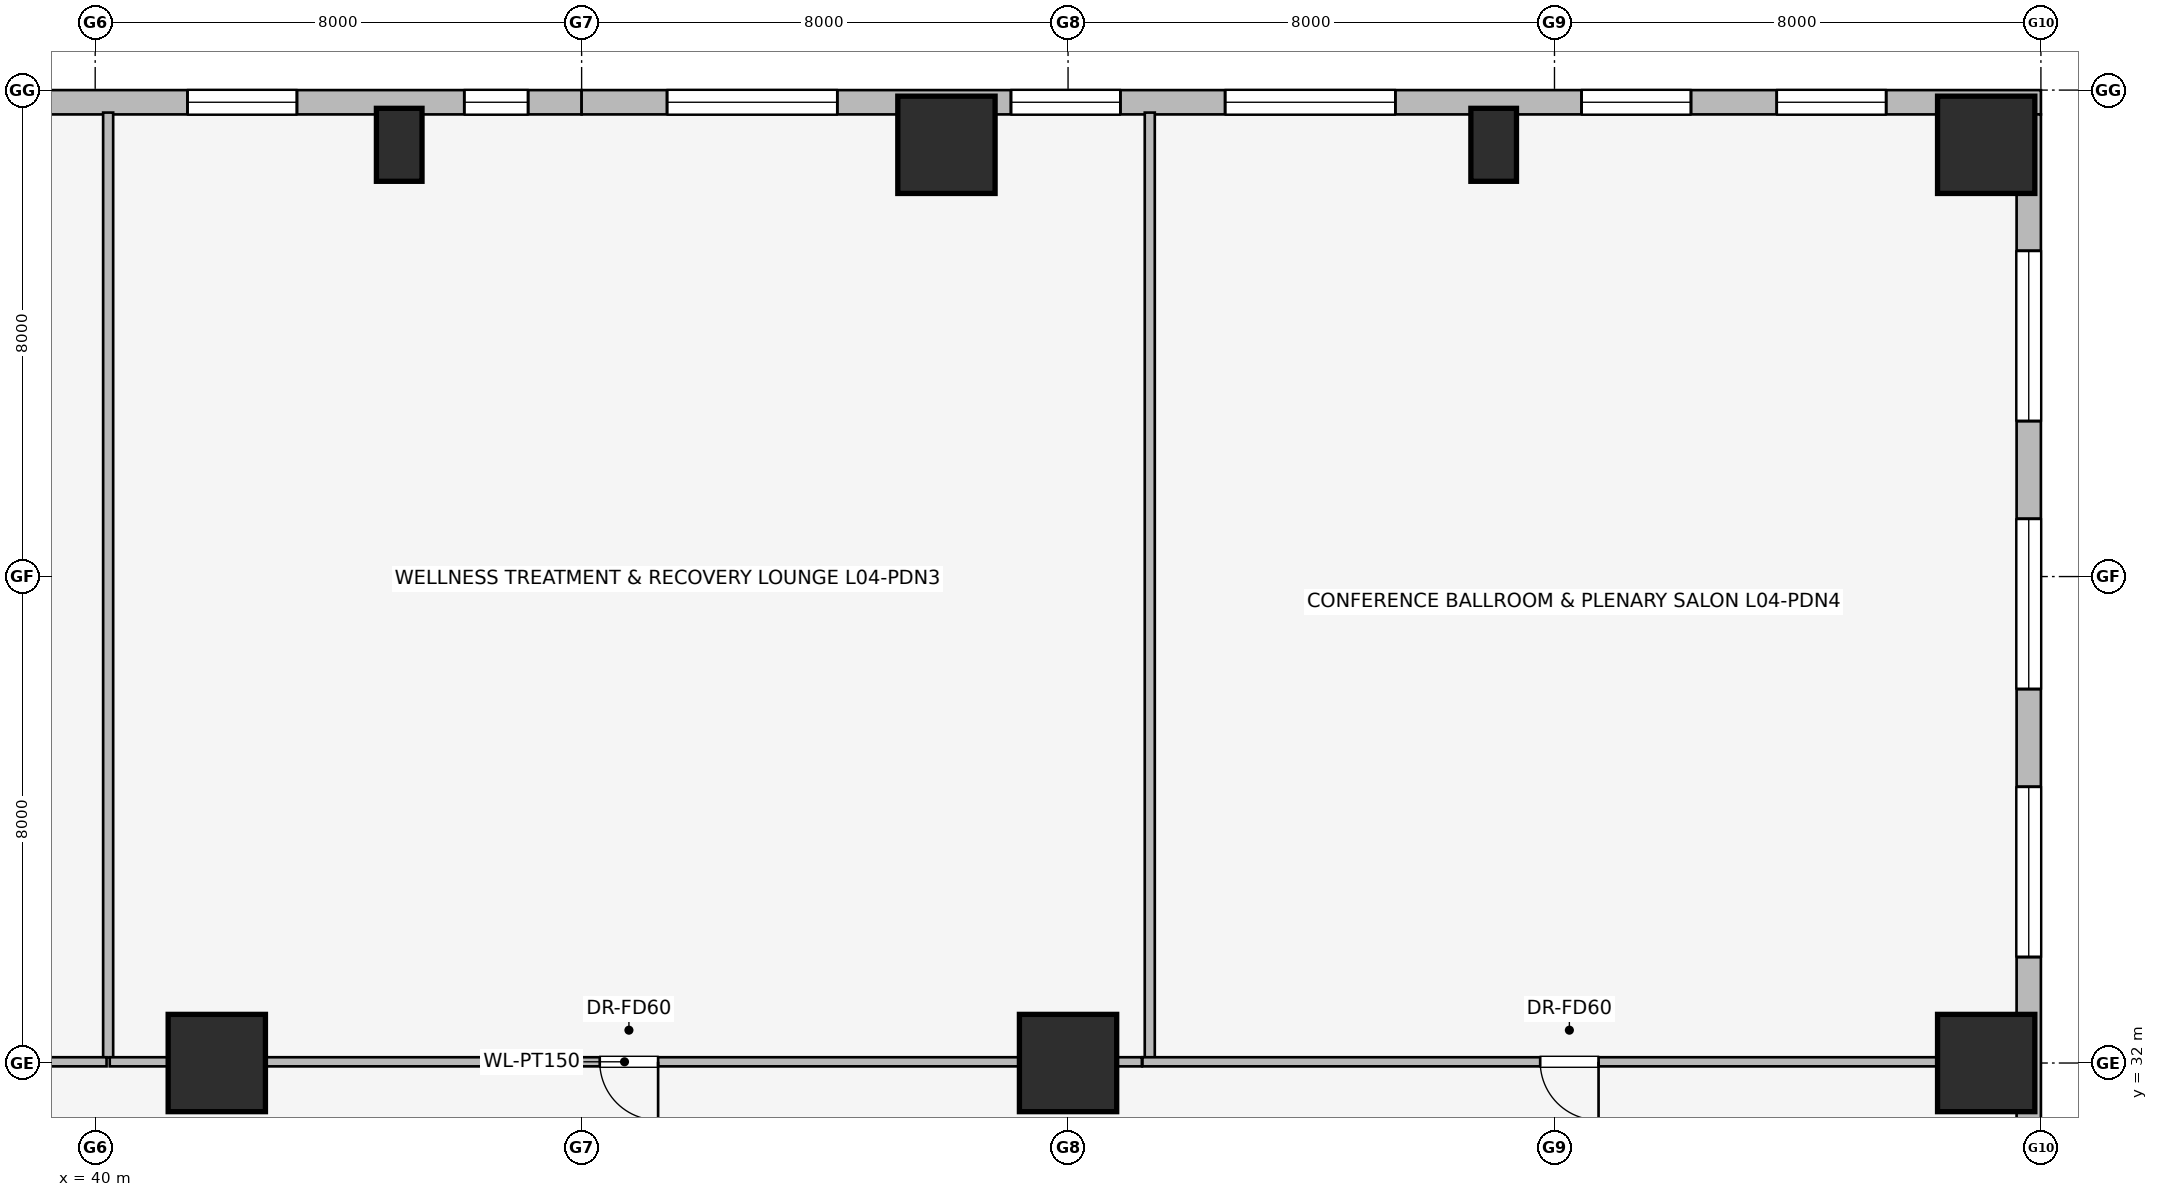
"""IFC4 building model, lengths in metres.
Left out: names, types, materials, properties, quantities, classifications, styles, units other than length and angle.
Written with IfcOpenShell. Run it as: python <this file> out.ifc"""

import sys

from ifc_helpers import new_model, si_unit, direction, frame, frame_2d, origin, origin_2d, place, context, subcontext, project, spatial, rectangle, extrude, element, fill, save


model = new_model("IFC4")
c1 = context("Model", 3, precision=1e-05, world=origin(), true_north=direction((0.0, 1.0)))
c2 = subcontext(c1, "Body", "Model", "MODEL_VIEW")
j1 = project(units=[si_unit("LENGTHUNIT", "METRE"), si_unit("PLANEANGLEUNIT", "RADIAN")], contexts=[c1])
p1 = place(None, origin())
s1 = spatial("IfcSite", under=j1, at=p1, CompositionType="ELEMENT")
p2 = place(p1, origin())
s2 = spatial("IfcBuilding", under=s1, at=p2, CompositionType="ELEMENT")
p3 = place(p2, frame((0.0, 0.0, 16.0)))
s3 = spatial("IfcBuildingStorey", under=s2, at=p3, CompositionType="ELEMENT", Elevation=16.0)
for number, where, z_axis, x_axis in (
    (1, (71.1, 47.1, 0.0), (0.0, 0.0, 1.0), (1.0, 0.0, 0.0)),
    (2, (54.0, 47.1, 0.0), (0.0, 0.0, 1.0), (1.0, 0.0, 0.0)),
    (3, (71.1, 32.0, 0.0), (0.0, 0.0, 1.0), (1.0, 0.0, 0.0)),
    (4, (42.0, 32.0, 0.0), (0.0, 0.0, 1.0), (1.0, 0.0, 0.0)),
    (5, (56.0, 32.0, 0.0), (0.0, 0.0, 1.0), (1.0, 0.0, 0.0)),
):
    element("IfcColumn", number, at=place(p3, frame(where, z_axis=z_axis, x_axis=x_axis)), inside=s3, PredefinedType="COLUMN", context=c2, shape_type="SweptSolid", body=[
        extrude(rectangle(XDim=1.6, YDim=1.6, at=origin_2d()), origin(), (0.0, 0.0, 1.0), 5.0),
    ])
for number, where, z_axis, x_axis in (
    (6, (45.0, 47.1, 0.0), (0.0, 0.0, 1.0), (1.0, 0.0, 0.0)),
    (7, (63.0, 47.1, 0.0), (0.0, 0.0, 1.0), (1.0, 0.0, 0.0)),
):
    element("IfcColumn", number, at=place(p3, frame(where, z_axis=z_axis, x_axis=x_axis)), inside=s3, PredefinedType="PILASTER", context=c2, shape_type="SweptSolid", body=[
        extrude(rectangle(XDim=0.75, YDim=1.2, at=origin_2d()), origin(), (0.0, 0.0, 1.0), 5.0),
    ])
p4 = place(p3, frame((24.0, 47.8, 0.0), z_axis=(0.0, 0.0, 1.0), x_axis=(1.0, 0.0, 0.0)))
e8 = element("IfcWall", 8, at=p4, inside=s3, PredefinedType="STANDARD", context=c2, shape_type="SweptSolid", body=[
    extrude(rectangle(XDim=24.0, YDim=0.4, at=frame_2d((12.0, 0.0))), origin(), (0.0, 0.0, 1.0), 4.58),
])
p5 = place(p4, frame((0.88, 0.0, 0.75)))
e9 = element("IfcOpeningElement", 9, at=p5, cuts=e8, PredefinedType="OPENING", context=c2, shape_type="SweptSolid", body=[
    extrude(rectangle(XDim=1.05, YDim=1.4, at=frame_2d((0.525, 0.7))), frame((0.0, 0.21, 0.0), z_axis=(0.0, -1.0, 0.0), x_axis=(1.0, 0.0, 0.0)), (0.0, 0.0, 1.0), 0.42),
])
p6 = place(p4, frame((4.06, 0.0, 0.75)))
e10 = element("IfcOpeningElement", 10, at=p6, cuts=e8, PredefinedType="OPENING", context=c2, shape_type="SweptSolid", body=[
    extrude(rectangle(XDim=1.8, YDim=1.5, at=frame_2d((0.9, 0.75))), frame((0.0, 0.21, 0.0), z_axis=(0.0, -1.0, 0.0), x_axis=(1.0, 0.0, 0.0)), (0.0, 0.0, 1.0), 0.42),
])
p7 = place(p4, frame((6.5, 0.0, 0.75)))
e11 = element("IfcOpeningElement", 11, at=p7, cuts=e8, PredefinedType="OPENING", context=c2, shape_type="SweptSolid", body=[
    extrude(rectangle(XDim=1.8, YDim=1.5, at=frame_2d((0.9, 0.75))), frame((0.0, 0.21, 0.0), z_axis=(0.0, -1.0, 0.0), x_axis=(1.0, 0.0, 0.0)), (0.0, 0.0, 1.0), 0.42),
])
p8 = place(p4, frame((8.94, 0.0, 0.75)))
e12 = element("IfcOpeningElement", 12, at=p8, cuts=e8, PredefinedType="OPENING", context=c2, shape_type="SweptSolid", body=[
    extrude(rectangle(XDim=1.8, YDim=1.5, at=frame_2d((0.9, 0.75))), frame((0.0, 0.21, 0.0), z_axis=(0.0, -1.0, 0.0), x_axis=(1.0, 0.0, 0.0)), (0.0, 0.0, 1.0), 0.42),
])
p9 = place(p4, frame((13.87, 0.0, 0.75)))
e13 = element("IfcOpeningElement", 13, at=p9, cuts=e8, PredefinedType="OPENING", context=c2, shape_type="SweptSolid", body=[
    extrude(rectangle(XDim=1.05, YDim=1.4, at=frame_2d((0.525, 0.7))), frame((0.0, 0.21, 0.0), z_axis=(0.0, -1.0, 0.0), x_axis=(1.0, 0.0, 0.0)), (0.0, 0.0, 1.0), 0.42),
])
p10 = place(p4, frame((17.518, 0.0, 0.75)))
e14 = element("IfcOpeningElement", 14, at=p10, cuts=e8, PredefinedType="OPENING", context=c2, shape_type="SweptSolid", body=[
    extrude(rectangle(XDim=1.8, YDim=1.5, at=frame_2d((0.9, 0.75))), frame((0.0, 0.21, 0.0), z_axis=(0.0, -1.0, 0.0), x_axis=(1.0, 0.0, 0.0)), (0.0, 0.0, 1.0), 0.42),
])
p11 = place(p4, frame((22.07, 0.0, 0.75)))
e15 = element("IfcOpeningElement", 15, at=p11, cuts=e8, PredefinedType="OPENING", context=c2, shape_type="SweptSolid", body=[
    extrude(rectangle(XDim=1.05, YDim=1.4, at=frame_2d((0.525, 0.7))), frame((0.0, 0.21, 0.0), z_axis=(0.0, -1.0, 0.0), x_axis=(1.0, 0.0, 0.0)), (0.0, 0.0, 1.0), 0.42),
])
p12 = place(p3, frame((48.0, 47.8, 0.0), z_axis=(0.0, 0.0, 1.0), x_axis=(1.0, 0.0, 0.0)))
e16 = element("IfcWall", 16, at=p12, inside=s3, PredefinedType="STANDARD", context=c2, shape_type="SweptSolid", body=[
    extrude(rectangle(XDim=24.0, YDim=0.4, at=frame_2d((12.0, 0.0))), origin(), (0.0, 0.0, 1.0), 4.58),
])
p13 = place(p12, frame((1.405, 0.0, 0.75)))
e17 = element("IfcOpeningElement", 17, at=p13, cuts=e16, PredefinedType="OPENING", context=c2, shape_type="SweptSolid", body=[
    extrude(rectangle(XDim=2.8, YDim=1.8, at=frame_2d((1.4, 0.9))), frame((0.0, 0.21, 0.0), z_axis=(0.0, -1.0, 0.0), x_axis=(1.0, 0.0, 0.0)), (0.0, 0.0, 1.0), 0.42),
])
p14 = place(p12, frame((7.061, 0.0, 0.75)))
e18 = element("IfcOpeningElement", 18, at=p14, cuts=e16, PredefinedType="OPENING", context=c2, shape_type="SweptSolid", body=[
    extrude(rectangle(XDim=1.8, YDim=1.5, at=frame_2d((0.9, 0.75))), frame((0.0, 0.21, 0.0), z_axis=(0.0, -1.0, 0.0), x_axis=(1.0, 0.0, 0.0)), (0.0, 0.0, 1.0), 0.42),
])
p15 = place(p12, frame((10.583, 0.0, 0.75)))
e19 = element("IfcOpeningElement", 19, at=p15, cuts=e16, PredefinedType="OPENING", context=c2, shape_type="SweptSolid", body=[
    extrude(rectangle(XDim=2.8, YDim=1.8, at=frame_2d((1.4, 0.9))), frame((0.0, 0.21, 0.0), z_axis=(0.0, -1.0, 0.0), x_axis=(1.0, 0.0, 0.0)), (0.0, 0.0, 1.0), 0.42),
])
p16 = place(p12, frame((16.445, 0.0, 0.75)))
e20 = element("IfcOpeningElement", 20, at=p16, cuts=e16, PredefinedType="OPENING", context=c2, shape_type="SweptSolid", body=[
    extrude(rectangle(XDim=1.8, YDim=1.5, at=frame_2d((0.9, 0.75))), frame((0.0, 0.21, 0.0), z_axis=(0.0, -1.0, 0.0), x_axis=(1.0, 0.0, 0.0)), (0.0, 0.0, 1.0), 0.42),
])
p17 = place(p12, frame((19.655, 0.0, 0.75)))
e21 = element("IfcOpeningElement", 21, at=p17, cuts=e16, PredefinedType="OPENING", context=c2, shape_type="SweptSolid", body=[
    extrude(rectangle(XDim=1.8, YDim=1.5, at=frame_2d((0.9, 0.75))), frame((0.0, 0.21, 0.0), z_axis=(0.0, -1.0, 0.0), x_axis=(1.0, 0.0, 0.0)), (0.0, 0.0, 1.0), 0.42),
])
p18 = place(p3, frame((71.8, 47.6, 0.0), z_axis=(0.0, 0.0, 1.0), x_axis=(0.0, -1.0, 0.0)))
e22 = element("IfcWall", 22, at=p18, inside=s3, PredefinedType="STANDARD", context=c2, shape_type="SweptSolid", body=[
    extrude(rectangle(XDim=16.6, YDim=0.4, at=frame_2d((8.3, 0.0))), origin(), (0.0, 0.0, 1.0), 4.58),
])
p19 = place(p18, frame((2.243, 0.0, 0.75)))
e23 = element("IfcOpeningElement", 23, at=p19, cuts=e22, PredefinedType="OPENING", context=c2, shape_type="SweptSolid", body=[
    extrude(rectangle(XDim=2.8, YDim=1.8, at=frame_2d((1.4, 0.9))), frame((0.0, 0.21, 0.0), z_axis=(0.0, -1.0, 0.0), x_axis=(1.0, 0.0, 0.0)), (0.0, 0.0, 1.0), 0.42),
])
p20 = place(p18, frame((6.65, 0.0, 0.75)))
e24 = element("IfcOpeningElement", 24, at=p20, cuts=e22, PredefinedType="OPENING", context=c2, shape_type="SweptSolid", body=[
    extrude(rectangle(XDim=2.8, YDim=1.8, at=frame_2d((1.4, 0.9))), frame((0.0, 0.21, 0.0), z_axis=(0.0, -1.0, 0.0), x_axis=(1.0, 0.0, 0.0)), (0.0, 0.0, 1.0), 0.42),
])
p21 = place(p18, frame((11.057, 0.0, 0.75)))
e25 = element("IfcOpeningElement", 25, at=p21, cuts=e22, PredefinedType="OPENING", context=c2, shape_type="SweptSolid", body=[
    extrude(rectangle(XDim=2.8, YDim=1.8, at=frame_2d((1.4, 0.9))), frame((0.0, 0.21, 0.0), z_axis=(0.0, -1.0, 0.0), x_axis=(1.0, 0.0, 0.0)), (0.0, 0.0, 1.0), 0.42),
])
p22 = place(p3, frame((40.213, 32.09, 0.0), z_axis=(0.0, 0.0, 1.0), x_axis=(0.0, 1.0, 0.0)))
e26 = element("IfcWall", 26, at=p22, inside=s3, PredefinedType="PARTITIONING", context=c2, shape_type="SweptSolid", body=[
    extrude(rectangle(XDim=15.54, YDim=0.165, at=frame_2d((7.77, 0.0))), origin(), (0.0, 0.0, 1.0), 3.972),
])
p23 = place(p3, frame((57.344, 32.09, 0.0), z_axis=(0.0, 0.0, 1.0), x_axis=(0.0, 1.0, 0.0)))
e27 = element("IfcWall", 27, at=p23, inside=s3, PredefinedType="PARTITIONING", context=c2, shape_type="SweptSolid", body=[
    extrude(rectangle(XDim=15.54, YDim=0.165, at=frame_2d((7.77, 0.0))), origin(), (0.0, 0.0, 1.0), 4.58),
])
p24 = place(p3, frame((40.187, 32.02, 0.0), z_axis=(0.0, 0.0, 1.0), x_axis=(-1.0, 0.0, 0.0)))
e28 = element("IfcWall", 28, at=p24, inside=s3, PredefinedType="PARTITIONING", context=c2, shape_type="SweptSolid", body=[
    extrude(rectangle(XDim=7.646, YDim=0.15, at=frame_2d((3.823, 0.0))), origin(), (0.0, 0.0, 1.0), 4.58),
])
p25 = place(p24, frame((3.343, 0.0, 0.0)))
e29 = element("IfcOpeningElement", 29, at=p25, cuts=e28, PredefinedType="OPENING", context=c2, shape_type="SweptSolid", body=[
    extrude(rectangle(XDim=0.96, YDim=2.0, at=frame_2d((0.48, 1.0))), frame((0.0, 0.085, 0.0), z_axis=(0.0, -1.0, 0.0), x_axis=(1.0, 0.0, 0.0)), (0.0, 0.0, 1.0), 0.17),
])
p26 = place(p3, frame((57.214, 32.02, 0.0), z_axis=(0.0, 0.0, 1.0), x_axis=(-1.0, 0.0, 0.0)))
e30 = element("IfcWall", 30, at=p26, inside=s3, PredefinedType="PARTITIONING", context=c2, shape_type="SweptSolid", body=[
    extrude(rectangle(XDim=16.975, YDim=0.15, at=frame_2d((8.488, 0.0))), origin(), (0.0, 0.0, 1.0), 3.632),
])
p27 = place(p26, frame((7.956, 0.0, 0.0)))
e31 = element("IfcOpeningElement", 31, at=p27, cuts=e30, PredefinedType="OPENING", context=c2, shape_type="SweptSolid", body=[
    extrude(rectangle(XDim=0.96, YDim=2.0, at=frame_2d((0.48, 1.0))), frame((0.0, 0.085, 0.0), z_axis=(0.0, -1.0, 0.0), x_axis=(1.0, 0.0, 0.0)), (0.0, 0.0, 1.0), 0.17),
])
p28 = place(p3, frame((71.605, 32.02, 0.0), z_axis=(0.0, 0.0, 1.0), x_axis=(-1.0, 0.0, 0.0)))
e32 = element("IfcWall", 32, at=p28, inside=s3, PredefinedType="PARTITIONING", context=c2, shape_type="SweptSolid", body=[
    extrude(rectangle(XDim=14.381, YDim=0.15, at=frame_2d((7.19, 0.0))), origin(), (0.0, 0.0, 1.0), 3.632),
])
p29 = place(p28, frame((6.88, 0.0, 0.0)))
e33 = element("IfcOpeningElement", 33, at=p29, cuts=e32, PredefinedType="OPENING", context=c2, shape_type="SweptSolid", body=[
    extrude(rectangle(XDim=0.96, YDim=2.0, at=frame_2d((0.48, 1.0))), frame((0.0, 0.085, 0.0), z_axis=(0.0, -1.0, 0.0), x_axis=(1.0, 0.0, 0.0)), (0.0, 0.0, 1.0), 0.17),
])
p30 = place(p10, origin())
e34 = element("IfcWindow", 34, at=p30, inside=s3, PartitioningType="SINGLE_PANEL", PredefinedType="WINDOW", context=c2, shape_type="SweptSolid", body=[
    extrude(rectangle(XDim=1.8, YDim=1.5, at=frame_2d((0.9, 0.75))), frame((0.0, 0.03, 0.0), z_axis=(0.0, -1.0, 0.0), x_axis=(1.0, 0.0, 0.0)), (0.0, 0.0, 1.0), 0.06),
])
fill(e14, e34)
p31 = place(p11, origin())
e35 = element("IfcWindow", 35, at=p31, inside=s3, PartitioningType="SINGLE_PANEL", PredefinedType="WINDOW", context=c2, shape_type="SweptSolid", body=[
    extrude(rectangle(XDim=1.05, YDim=1.4, at=frame_2d((0.525, 0.7))), frame((0.0, 0.03, 0.0), z_axis=(0.0, -1.0, 0.0), x_axis=(1.0, 0.0, 0.0)), (0.0, 0.0, 1.0), 0.06),
])
fill(e15, e35)
p32 = place(p13, origin())
e36 = element("IfcWindow", 36, at=p32, inside=s3, PartitioningType="SINGLE_PANEL", PredefinedType="WINDOW", context=c2, shape_type="SweptSolid", body=[
    extrude(rectangle(XDim=2.8, YDim=1.8, at=frame_2d((1.4, 0.9))), frame((0.0, 0.03, 0.0), z_axis=(0.0, -1.0, 0.0), x_axis=(1.0, 0.0, 0.0)), (0.0, 0.0, 1.0), 0.06),
])
fill(e17, e36)
p33 = place(p14, origin())
e37 = element("IfcWindow", 37, at=p33, inside=s3, PartitioningType="SINGLE_PANEL", PredefinedType="WINDOW", context=c2, shape_type="SweptSolid", body=[
    extrude(rectangle(XDim=1.8, YDim=1.5, at=frame_2d((0.9, 0.75))), frame((0.0, 0.03, 0.0), z_axis=(0.0, -1.0, 0.0), x_axis=(1.0, 0.0, 0.0)), (0.0, 0.0, 1.0), 0.06),
])
fill(e18, e37)
p34 = place(p15, origin())
e38 = element("IfcWindow", 38, at=p34, inside=s3, PartitioningType="SINGLE_PANEL", PredefinedType="WINDOW", context=c2, shape_type="SweptSolid", body=[
    extrude(rectangle(XDim=2.8, YDim=1.8, at=frame_2d((1.4, 0.9))), frame((0.0, 0.03, 0.0), z_axis=(0.0, -1.0, 0.0), x_axis=(1.0, 0.0, 0.0)), (0.0, 0.0, 1.0), 0.06),
])
fill(e19, e38)
p35 = place(p16, origin())
e39 = element("IfcWindow", 39, at=p35, inside=s3, PartitioningType="SINGLE_PANEL", PredefinedType="WINDOW", context=c2, shape_type="SweptSolid", body=[
    extrude(rectangle(XDim=1.8, YDim=1.5, at=frame_2d((0.9, 0.75))), frame((0.0, 0.03, 0.0), z_axis=(0.0, -1.0, 0.0), x_axis=(1.0, 0.0, 0.0)), (0.0, 0.0, 1.0), 0.06),
])
fill(e20, e39)
p36 = place(p17, origin())
e40 = element("IfcWindow", 40, at=p36, inside=s3, PartitioningType="SINGLE_PANEL", PredefinedType="WINDOW", context=c2, shape_type="SweptSolid", body=[
    extrude(rectangle(XDim=1.8, YDim=1.5, at=frame_2d((0.9, 0.75))), frame((0.0, 0.03, 0.0), z_axis=(0.0, -1.0, 0.0), x_axis=(1.0, 0.0, 0.0)), (0.0, 0.0, 1.0), 0.06),
])
fill(e21, e40)
p37 = place(p19, origin())
e41 = element("IfcWindow", 41, at=p37, inside=s3, PartitioningType="SINGLE_PANEL", PredefinedType="WINDOW", context=c2, shape_type="SweptSolid", body=[
    extrude(rectangle(XDim=2.8, YDim=1.8, at=frame_2d((1.4, 0.9))), frame((0.0, 0.03, 0.0), z_axis=(0.0, -1.0, 0.0), x_axis=(1.0, 0.0, 0.0)), (0.0, 0.0, 1.0), 0.06),
])
fill(e23, e41)
p38 = place(p20, origin())
e42 = element("IfcWindow", 42, at=p38, inside=s3, PartitioningType="SINGLE_PANEL", PredefinedType="WINDOW", context=c2, shape_type="SweptSolid", body=[
    extrude(rectangle(XDim=2.8, YDim=1.8, at=frame_2d((1.4, 0.9))), frame((0.0, 0.03, 0.0), z_axis=(0.0, -1.0, 0.0), x_axis=(1.0, 0.0, 0.0)), (0.0, 0.0, 1.0), 0.06),
])
fill(e24, e42)
p39 = place(p21, origin())
e43 = element("IfcWindow", 43, at=p39, inside=s3, PartitioningType="SINGLE_PANEL", PredefinedType="WINDOW", context=c2, shape_type="SweptSolid", body=[
    extrude(rectangle(XDim=2.8, YDim=1.8, at=frame_2d((1.4, 0.9))), frame((0.0, 0.03, 0.0), z_axis=(0.0, -1.0, 0.0), x_axis=(1.0, 0.0, 0.0)), (0.0, 0.0, 1.0), 0.06),
])
fill(e25, e43)
p40 = place(p27, origin())
e44 = element("IfcDoor", 44, at=p40, inside=s3, OperationType="SINGLE_SWING_LEFT", PredefinedType="DOOR", context=c2, shape_type="SweptSolid", body=[
    extrude(rectangle(XDim=0.96, YDim=2.0, at=frame_2d((0.48, 1.0))), frame((0.0, 0.025, 0.0), z_axis=(0.0, -1.0, 0.0), x_axis=(1.0, 0.0, 0.0)), (0.0, 0.0, 1.0), 0.05),
])
fill(e31, e44)
p41 = place(p29, origin())
e45 = element("IfcDoor", 45, at=p41, inside=s3, OperationType="SINGLE_SWING_LEFT", PredefinedType="DOOR", context=c2, shape_type="SweptSolid", body=[
    extrude(rectangle(XDim=0.96, YDim=2.0, at=frame_2d((0.48, 1.0))), frame((0.0, 0.025, 0.0), z_axis=(0.0, -1.0, 0.0), x_axis=(1.0, 0.0, 0.0)), (0.0, 0.0, 1.0), 0.05),
])
fill(e33, e45)
save(model, sys.argv[1])
